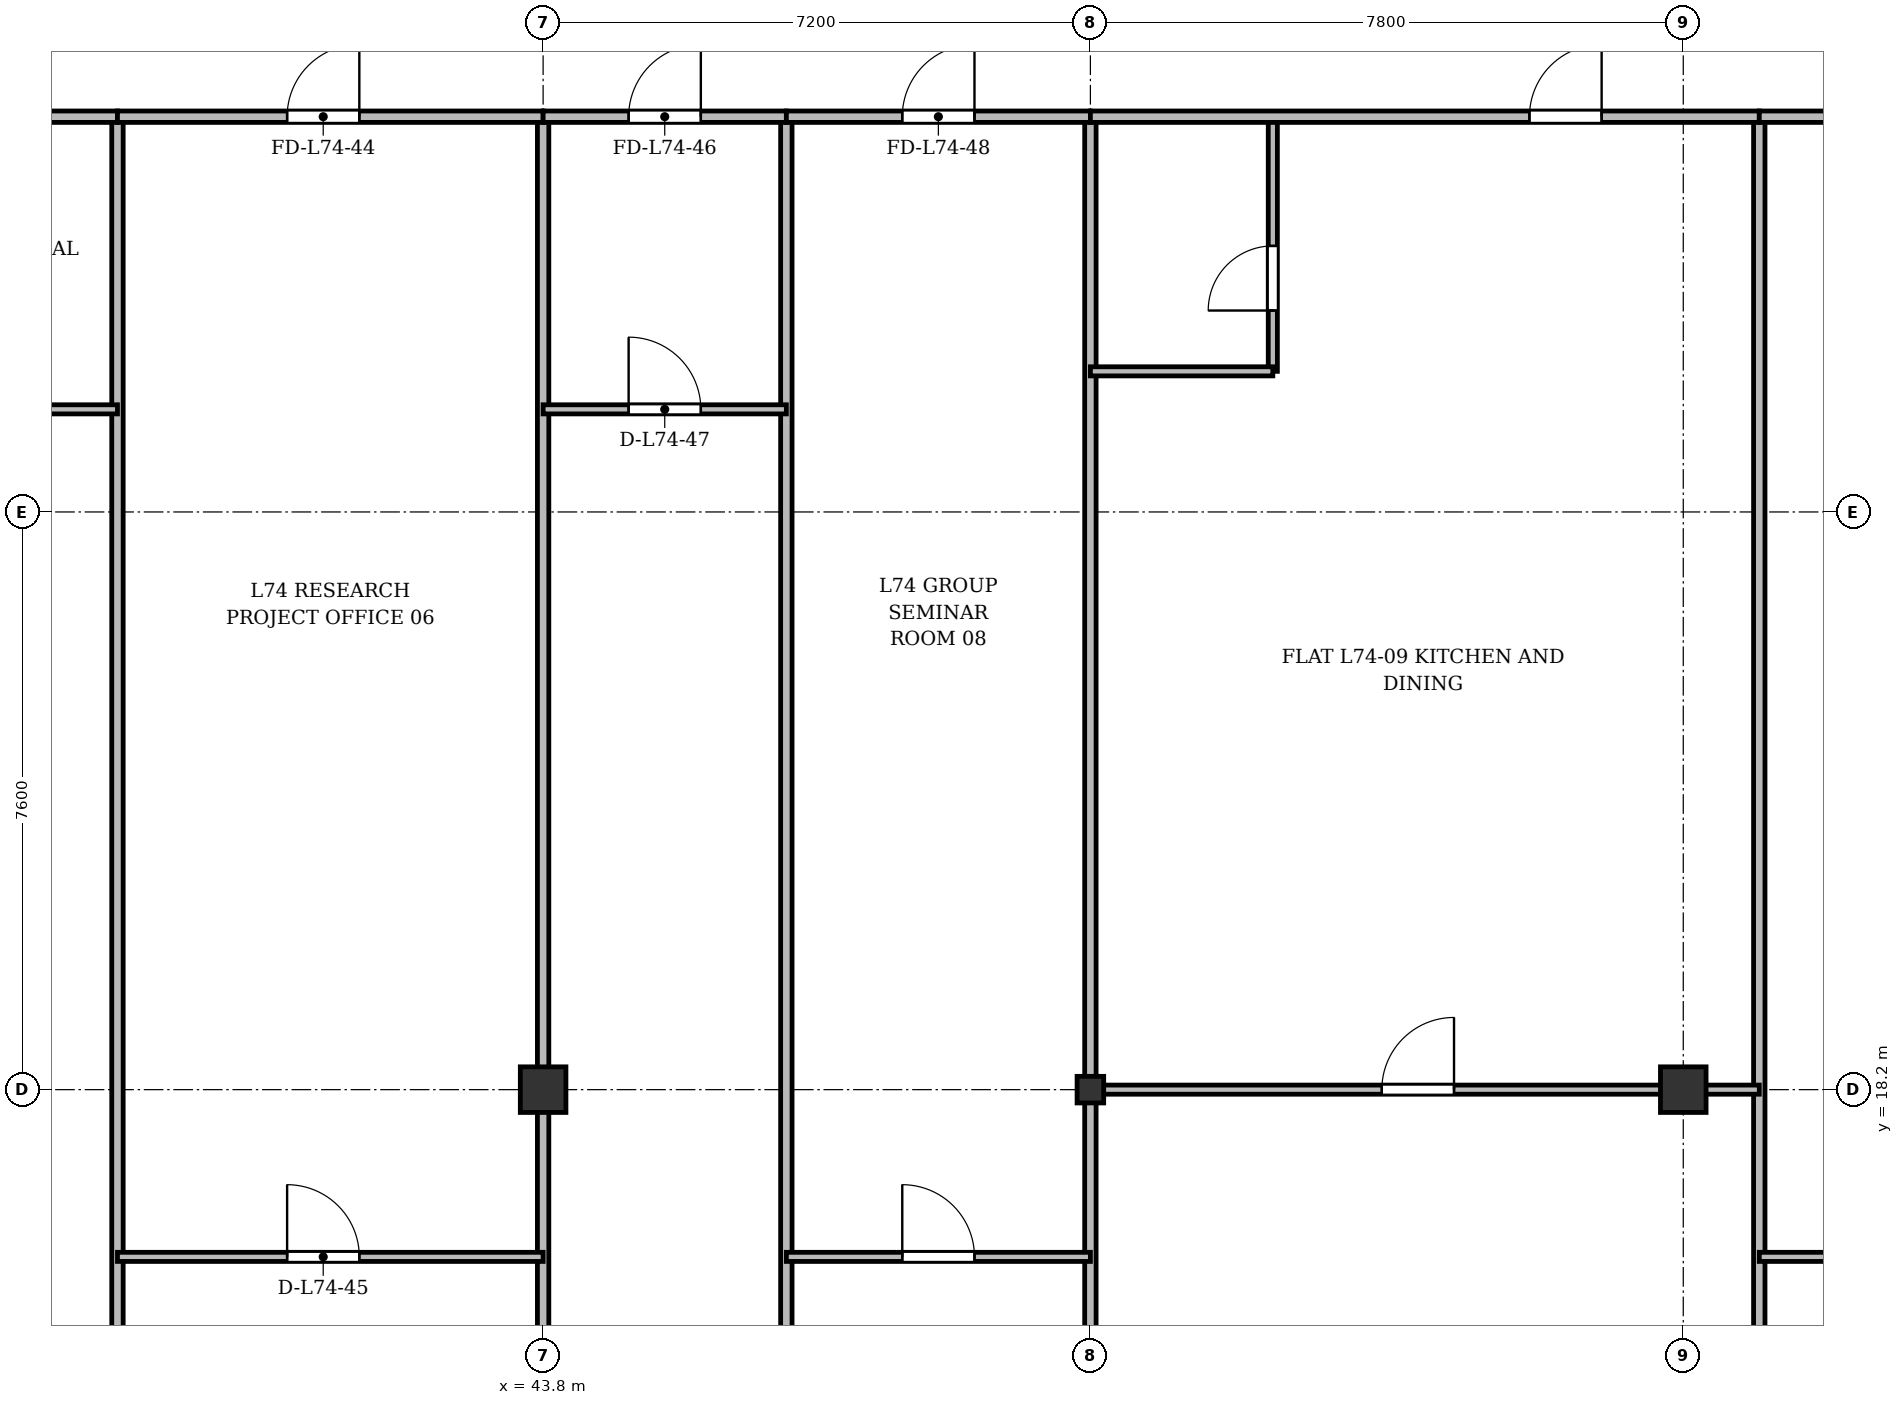
"""IFC4 building model, lengths in metres.
Left out: names, types, materials, properties, quantities, classifications, styles, units other than length and angle.
Written with IfcOpenShell. Run it as: python <this file> out.ifc"""

import sys

from ifc_helpers import new_model, si_unit, direction, frame, frame_2d, origin, origin_2d, place, context, subcontext, project, spatial, rectangle, i_section, extrude, source, transform, mapped, element, fill, save


model = new_model("IFC4")
c1 = context("Model", 3, precision=1e-05, world=origin(), true_north=direction((0.0, 1.0)))
c2 = subcontext(c1, "Body", "Model", "MODEL_VIEW")
j1 = project(units=[si_unit("LENGTHUNIT", "METRE"), si_unit("PLANEANGLEUNIT", "RADIAN")], contexts=[c1])
p1 = place(None, origin())
s1 = spatial("IfcSite", under=j1, at=p1, CompositionType="ELEMENT")
p2 = place(p1, origin())
s2 = spatial("IfcBuilding", under=s1, at=p2, CompositionType="ELEMENT")
p3 = place(p2, frame((0.0, 0.0, 284.7)))
s3 = spatial("IfcBuildingStorey", under=s2, at=p3, CompositionType="ELEMENT", Elevation=284.7)
m1 = source(origin(), c2, "Body", "SweptSolid", [
    extrude(rectangle(XDim=0.6, YDim=0.6, at=origin_2d()), origin(), (0.0, 0.0, 1.0), 3.6),
])
p4 = place(p3, frame((43.8, 18.2, 0.0), z_axis=(0.0, 0.0, 1.0), x_axis=(1.0, 0.0, 0.0)))
e1 = element("IfcColumn", 1, at=p4, inside=s3, PredefinedType="COLUMN", context=c2, shape_type="MappedRepresentation", body=[
    mapped(m1, transform((0.0, 0.0, 0.0), x_axis=(1.0, 0.0, 0.0), y_axis=(0.0, 1.0, 0.0), z_axis=(0.0, 0.0, 1.0), scale=1.0)),
])
m2 = source(origin(), c2, "Body", "SweptSolid", [
    extrude(i_section(OverallWidth=0.35, OverallDepth=0.35, WebThickness=0.018, FlangeThickness=0.028, at=origin_2d()), origin(), (0.0, 0.0, 1.0), 3.6),
])
p5 = place(p3, frame((51.0, 18.2, 0.0), z_axis=(0.0, 0.0, 1.0), x_axis=(1.0, 0.0, 0.0)))
e2 = element("IfcColumn", 2, at=p5, inside=s3, PredefinedType="COLUMN", context=c2, shape_type="MappedRepresentation", body=[
    mapped(m2, transform((0.0, 0.0, 0.0), x_axis=(1.0, 0.0, 0.0), y_axis=(0.0, 1.0, 0.0), z_axis=(0.0, 0.0, 1.0), scale=1.0)),
])
p6 = place(p3, frame((58.8, 18.2, 0.0), z_axis=(0.0, 0.0, 1.0), x_axis=(1.0, 0.0, 0.0)))
e3 = element("IfcColumn", 3, at=p6, inside=s3, PredefinedType="COLUMN", context=c2, shape_type="MappedRepresentation", body=[
    mapped(m1, transform((0.0, 0.0, 0.0), x_axis=(1.0, 0.0, 0.0), y_axis=(0.0, 1.0, 0.0), z_axis=(0.0, 0.0, 1.0), scale=1.0)),
])
p7 = place(p3, frame((38.2, 3.725, 0.0), z_axis=(0.0, 0.0, 1.0), x_axis=(0.0, 1.0, 0.0)))
e4 = element("IfcWall", 4, at=p7, inside=s3, PredefinedType="PARTITIONING", context=c2, shape_type="SweptSolid", body=[
    extrude(rectangle(XDim=27.275, YDim=0.15, at=frame_2d((13.637, 0.0))), origin(), (0.0, 0.0, 1.0), 2.92),
])
p8 = place(p3, frame((43.8, 3.725, 0.0), z_axis=(0.0, 0.0, 1.0), x_axis=(0.0, 1.0, 0.0)))
e5 = element("IfcWall", 5, at=p8, inside=s3, PredefinedType="PARTITIONING", context=c2, shape_type="SweptSolid", body=[
    extrude(rectangle(XDim=27.275, YDim=0.15, at=frame_2d((13.637, 0.0))), origin(), (0.0, 0.0, 1.0), 2.87),
])
p9 = place(p3, frame((47.0, 3.725, 0.0), z_axis=(0.0, 0.0, 1.0), x_axis=(0.0, 1.0, 0.0)))
e6 = element("IfcWall", 6, at=p9, inside=s3, PredefinedType="PARTITIONING", context=c2, shape_type="SweptSolid", body=[
    extrude(rectangle(XDim=27.275, YDim=0.15, at=frame_2d((13.637, 0.0))), origin(), (0.0, 0.0, 1.0), 2.92),
])
p10 = place(p3, frame((51.0, 3.725, 0.0), z_axis=(0.0, 0.0, 1.0), x_axis=(0.0, 1.0, 0.0)))
e7 = element("IfcWall", 7, at=p10, inside=s3, PredefinedType="PARTITIONING", context=c2, shape_type="SweptSolid", body=[
    extrude(rectangle(XDim=27.275, YDim=0.15, at=frame_2d((13.637, 0.0))), origin(), (0.0, 0.0, 1.0), 2.87),
])
p11 = place(p3, frame((59.8, 3.725, 0.0), z_axis=(0.0, 0.0, 1.0), x_axis=(0.0, 1.0, 0.0)))
e8 = element("IfcWall", 8, at=p11, inside=s3, PredefinedType="PARTITIONING", context=c2, shape_type="SweptSolid", body=[
    extrude(rectangle(XDim=27.275, YDim=0.15, at=frame_2d((13.637, 0.0))), origin(), (0.0, 0.0, 1.0), 2.92),
])
p12 = place(p3, frame((30.6, 31.0, 0.0), z_axis=(0.0, 0.0, 1.0), x_axis=(1.0, 0.0, 0.0)))
e9 = element("IfcWall", 9, at=p12, inside=s3, PredefinedType="PARTITIONING", context=c2, shape_type="SweptSolid", body=[
    extrude(rectangle(XDim=7.6, YDim=0.15, at=frame_2d((3.8, 0.0))), origin(), (0.0, 0.0, 1.0), 2.87),
])
p13 = place(p12, frame((3.325, 0.0, 0.0)))
e10 = element("IfcOpeningElement", 10, at=p13, cuts=e9, PredefinedType="OPENING", context=c2, shape_type="SweptSolid", body=[
    extrude(rectangle(XDim=0.95, YDim=2.15, at=frame_2d((0.475, 1.075))), frame((0.0, 0.085, 0.0), z_axis=(0.0, -1.0, 0.0), x_axis=(1.0, 0.0, 0.0)), (0.0, 0.0, 1.0), 0.17),
])
p14 = place(p3, frame((30.6, 27.15, 0.0), z_axis=(0.0, 0.0, 1.0), x_axis=(1.0, 0.0, 0.0)))
e11 = element("IfcWall", 11, at=p14, inside=s3, PredefinedType="PARTITIONING", context=c2, shape_type="SweptSolid", body=[
    extrude(rectangle(XDim=7.6, YDim=0.12, at=frame_2d((3.8, 0.0))), origin(), (0.0, 0.0, 1.0), 2.87),
])
p15 = place(p14, frame((3.325, 0.0, 0.0)))
e12 = element("IfcOpeningElement", 12, at=p15, cuts=e11, PredefinedType="OPENING", context=c2, shape_type="SweptSolid", body=[
    extrude(rectangle(XDim=0.95, YDim=2.15, at=frame_2d((0.475, 1.075))), frame((0.0, 0.07, 0.0), z_axis=(0.0, -1.0, 0.0), x_axis=(1.0, 0.0, 0.0)), (0.0, 0.0, 1.0), 0.14),
])
p16 = place(p3, frame((38.2, 31.0, 0.0), z_axis=(0.0, 0.0, 1.0), x_axis=(1.0, 0.0, 0.0)))
e13 = element("IfcWall", 13, at=p16, inside=s3, PredefinedType="PARTITIONING", context=c2, shape_type="SweptSolid", body=[
    extrude(rectangle(XDim=5.6, YDim=0.15, at=frame_2d((2.8, 0.0))), origin(), (0.0, 0.0, 1.0), 2.87),
])
p17 = place(p16, frame((2.232, 0.0, 0.0)))
e14 = element("IfcOpeningElement", 14, at=p17, cuts=e13, PredefinedType="OPENING", context=c2, shape_type="SweptSolid", body=[
    extrude(rectangle(XDim=0.95, YDim=2.15, at=frame_2d((0.475, 1.075))), frame((0.0, 0.085, 0.0), z_axis=(0.0, -1.0, 0.0), x_axis=(1.0, 0.0, 0.0)), (0.0, 0.0, 1.0), 0.17),
])
p18 = place(p3, frame((38.2, 16.0, 0.0), z_axis=(0.0, 0.0, 1.0), x_axis=(1.0, 0.0, 0.0)))
e15 = element("IfcWall", 15, at=p18, inside=s3, PredefinedType="PARTITIONING", context=c2, shape_type="SweptSolid", body=[
    extrude(rectangle(XDim=5.6, YDim=0.12, at=frame_2d((2.8, 0.0))), origin(), (0.0, 0.0, 1.0), 2.87),
])
p19 = place(p18, frame((2.232, 0.0, 0.0)))
e16 = element("IfcOpeningElement", 16, at=p19, cuts=e15, PredefinedType="OPENING", context=c2, shape_type="SweptSolid", body=[
    extrude(rectangle(XDim=0.95, YDim=2.15, at=frame_2d((0.475, 1.075))), frame((0.0, 0.07, 0.0), z_axis=(0.0, -1.0, 0.0), x_axis=(1.0, 0.0, 0.0)), (0.0, 0.0, 1.0), 0.14),
])
p20 = place(p3, frame((43.8, 31.0, 0.0), z_axis=(0.0, 0.0, 1.0), x_axis=(1.0, 0.0, 0.0)))
e17 = element("IfcWall", 17, at=p20, inside=s3, PredefinedType="PARTITIONING", context=c2, shape_type="SweptSolid", body=[
    extrude(rectangle(XDim=3.2, YDim=0.15, at=frame_2d((1.6, 0.0))), origin(), (0.0, 0.0, 1.0), 2.87),
])
p21 = place(p20, frame((1.125, 0.0, 0.0)))
e18 = element("IfcOpeningElement", 18, at=p21, cuts=e17, PredefinedType="OPENING", context=c2, shape_type="SweptSolid", body=[
    extrude(rectangle(XDim=0.95, YDim=2.15, at=frame_2d((0.475, 1.075))), frame((0.0, 0.085, 0.0), z_axis=(0.0, -1.0, 0.0), x_axis=(1.0, 0.0, 0.0)), (0.0, 0.0, 1.0), 0.17),
])
p22 = place(p3, frame((43.8, 27.15, 0.0), z_axis=(0.0, 0.0, 1.0), x_axis=(1.0, 0.0, 0.0)))
e19 = element("IfcWall", 19, at=p22, inside=s3, PredefinedType="PARTITIONING", context=c2, shape_type="SweptSolid", body=[
    extrude(rectangle(XDim=3.2, YDim=0.12, at=frame_2d((1.6, 0.0))), origin(), (0.0, 0.0, 1.0), 2.87),
])
p23 = place(p22, frame((1.125, 0.0, 0.0)))
e20 = element("IfcOpeningElement", 20, at=p23, cuts=e19, PredefinedType="OPENING", context=c2, shape_type="SweptSolid", body=[
    extrude(rectangle(XDim=0.95, YDim=2.15, at=frame_2d((0.475, 1.075))), frame((0.0, 0.07, 0.0), z_axis=(0.0, -1.0, 0.0), x_axis=(1.0, 0.0, 0.0)), (0.0, 0.0, 1.0), 0.14),
])
p24 = place(p3, frame((47.0, 31.0, 0.0), z_axis=(0.0, 0.0, 1.0), x_axis=(1.0, 0.0, 0.0)))
e21 = element("IfcWall", 21, at=p24, inside=s3, PredefinedType="PARTITIONING", context=c2, shape_type="SweptSolid", body=[
    extrude(rectangle(XDim=4.0, YDim=0.15, at=frame_2d((2.0, 0.0))), origin(), (0.0, 0.0, 1.0), 2.87),
])
p25 = place(p24, frame((1.525, 0.0, 0.0)))
e22 = element("IfcOpeningElement", 22, at=p25, cuts=e21, PredefinedType="OPENING", context=c2, shape_type="SweptSolid", body=[
    extrude(rectangle(XDim=0.95, YDim=2.15, at=frame_2d((0.475, 1.075))), frame((0.0, 0.085, 0.0), z_axis=(0.0, -1.0, 0.0), x_axis=(1.0, 0.0, 0.0)), (0.0, 0.0, 1.0), 0.17),
])
p26 = place(p3, frame((47.0, 16.0, 0.0), z_axis=(0.0, 0.0, 1.0), x_axis=(1.0, 0.0, 0.0)))
e23 = element("IfcWall", 23, at=p26, inside=s3, PredefinedType="PARTITIONING", context=c2, shape_type="SweptSolid", body=[
    extrude(rectangle(XDim=4.0, YDim=0.12, at=frame_2d((2.0, 0.0))), origin(), (0.0, 0.0, 1.0), 2.87),
])
p27 = place(p26, frame((1.525, 0.0, 0.0)))
e24 = element("IfcOpeningElement", 24, at=p27, cuts=e23, PredefinedType="OPENING", context=c2, shape_type="SweptSolid", body=[
    extrude(rectangle(XDim=0.95, YDim=2.15, at=frame_2d((0.475, 1.075))), frame((0.0, 0.07, 0.0), z_axis=(0.0, -1.0, 0.0), x_axis=(1.0, 0.0, 0.0)), (0.0, 0.0, 1.0), 0.14),
])
p28 = place(p3, frame((51.0, 18.2, 0.0), z_axis=(0.0, 0.0, 1.0), x_axis=(1.0, 0.0, 0.0)))
e25 = element("IfcWall", 25, at=p28, inside=s3, PredefinedType="PARTITIONING", context=c2, shape_type="SweptSolid", body=[
    extrude(rectangle(XDim=8.8, YDim=0.12, at=frame_2d((4.4, 0.0))), origin(), (0.0, 0.0, 1.0), 2.92),
])
p29 = place(p28, frame((3.834, 0.0, 0.0)))
e26 = element("IfcOpeningElement", 26, at=p29, cuts=e25, PredefinedType="OPENING", context=c2, shape_type="SweptSolid", body=[
    extrude(rectangle(XDim=0.95, YDim=2.15, at=frame_2d((0.475, 1.075))), frame((0.0, 0.07, 0.0), z_axis=(0.0, -1.0, 0.0), x_axis=(1.0, 0.0, 0.0)), (0.0, 0.0, 1.0), 0.14),
])
p30 = place(p3, frame((53.4, 27.65, 0.0), z_axis=(0.0, 0.0, 1.0), x_axis=(0.0, 1.0, 0.0)))
e27 = element("IfcWall", 27, at=p30, inside=s3, PredefinedType="PARTITIONING", context=c2, shape_type="SweptSolid", body=[
    extrude(rectangle(XDim=3.35, YDim=0.12, at=frame_2d((1.675, 0.0))), origin(), (0.0, 0.0, 1.0), 3.37),
])
p31 = place(p30, frame((0.8, 0.0, 0.0)))
e28 = element("IfcOpeningElement", 28, at=p31, cuts=e27, PredefinedType="OPENING", context=c2, shape_type="SweptSolid", body=[
    extrude(rectangle(XDim=0.85, YDim=2.1, at=frame_2d((0.425, 1.05))), frame((0.0, 0.07, 0.0), z_axis=(0.0, -1.0, 0.0), x_axis=(1.0, 0.0, 0.0)), (0.0, 0.0, 1.0), 0.14),
])
p32 = place(p3, frame((51.0, 27.65, 0.0), z_axis=(0.0, 0.0, 1.0), x_axis=(1.0, 0.0, 0.0)))
e29 = element("IfcWall", 29, at=p32, inside=s3, PredefinedType="PARTITIONING", context=c2, shape_type="SweptSolid", body=[
    extrude(rectangle(XDim=2.4, YDim=0.12, at=frame_2d((1.2, 0.0))), origin(), (0.0, 0.0, 1.0), 2.87),
])
p33 = place(p3, frame((51.0, 31.0, 0.0), z_axis=(0.0, 0.0, 1.0), x_axis=(1.0, 0.0, 0.0)))
e30 = element("IfcWall", 30, at=p33, inside=s3, PredefinedType="PARTITIONING", context=c2, shape_type="SweptSolid", body=[
    extrude(rectangle(XDim=8.8, YDim=0.15, at=frame_2d((4.4, 0.0))), origin(), (0.0, 0.0, 1.0), 2.87),
])
p34 = place(p33, frame((5.776, 0.0, 0.0)))
e31 = element("IfcOpeningElement", 31, at=p34, cuts=e30, PredefinedType="OPENING", context=c2, shape_type="SweptSolid", body=[
    extrude(rectangle(XDim=0.95, YDim=2.15, at=frame_2d((0.475, 1.075))), frame((0.0, 0.085, 0.0), z_axis=(0.0, -1.0, 0.0), x_axis=(1.0, 0.0, 0.0)), (0.0, 0.0, 1.0), 0.17),
])
p35 = place(p3, frame((59.8, 31.0, 0.0), z_axis=(0.0, 0.0, 1.0), x_axis=(1.0, 0.0, 0.0)))
e32 = element("IfcWall", 32, at=p35, inside=s3, PredefinedType="PARTITIONING", context=c2, shape_type="SweptSolid", body=[
    extrude(rectangle(XDim=6.175, YDim=0.15, at=frame_2d((3.087, 0.0))), origin(), (0.0, 0.0, 1.0), 2.87),
])
p36 = place(p35, frame((2.612, 0.0, 0.0)))
e33 = element("IfcOpeningElement", 33, at=p36, cuts=e32, PredefinedType="OPENING", context=c2, shape_type="SweptSolid", body=[
    extrude(rectangle(XDim=0.95, YDim=2.15, at=frame_2d((0.475, 1.075))), frame((0.0, 0.085, 0.0), z_axis=(0.0, -1.0, 0.0), x_axis=(1.0, 0.0, 0.0)), (0.0, 0.0, 1.0), 0.17),
])
p37 = place(p3, frame((59.8, 16.0, 0.0), z_axis=(0.0, 0.0, 1.0), x_axis=(1.0, 0.0, 0.0)))
e34 = element("IfcWall", 34, at=p37, inside=s3, PredefinedType="PARTITIONING", context=c2, shape_type="SweptSolid", body=[
    extrude(rectangle(XDim=6.175, YDim=0.12, at=frame_2d((3.087, 0.0))), origin(), (0.0, 0.0, 1.0), 2.87),
])
p38 = place(p37, frame((2.612, 0.0, 0.0)))
e35 = element("IfcOpeningElement", 35, at=p38, cuts=e34, PredefinedType="OPENING", context=c2, shape_type="SweptSolid", body=[
    extrude(rectangle(XDim=0.95, YDim=2.15, at=frame_2d((0.475, 1.075))), frame((0.0, 0.07, 0.0), z_axis=(0.0, -1.0, 0.0), x_axis=(1.0, 0.0, 0.0)), (0.0, 0.0, 1.0), 0.14),
])
m3 = source(origin(), c2, "Body", "SweptSolid", [
    extrude(rectangle(XDim=0.95, YDim=2.15, at=frame_2d((0.475, 1.075))), frame((0.0, 0.025, 0.0), z_axis=(0.0, -1.0, 0.0), x_axis=(1.0, 0.0, 0.0)), (0.0, 0.0, 1.0), 0.05),
])
p39 = place(p17, origin())
e36 = element("IfcDoor", 36, at=p39, inside=s3, OperationType="SINGLE_SWING_RIGHT", PredefinedType="DOOR", context=c2, shape_type="MappedRepresentation", body=[
    mapped(m3, transform((0.0, 0.0, 0.0), x_axis=(1.0, 0.0, 0.0), y_axis=(0.0, 1.0, 0.0), z_axis=(0.0, 0.0, 1.0), scale=1.0)),
])
fill(e14, e36)
p40 = place(p19, origin())
e37 = element("IfcDoor", 37, at=p40, inside=s3, OperationType="SINGLE_SWING_LEFT", PredefinedType="DOOR", context=c2, shape_type="MappedRepresentation", body=[
    mapped(m3, transform((0.0, 0.0, 0.0), x_axis=(1.0, 0.0, 0.0), y_axis=(0.0, 1.0, 0.0), z_axis=(0.0, 0.0, 1.0), scale=1.0)),
])
fill(e16, e37)
p41 = place(p21, origin())
e38 = element("IfcDoor", 38, at=p41, inside=s3, OperationType="SINGLE_SWING_RIGHT", PredefinedType="DOOR", context=c2, shape_type="MappedRepresentation", body=[
    mapped(m3, transform((0.0, 0.0, 0.0), x_axis=(1.0, 0.0, 0.0), y_axis=(0.0, 1.0, 0.0), z_axis=(0.0, 0.0, 1.0), scale=1.0)),
])
fill(e18, e38)
p42 = place(p23, origin())
e39 = element("IfcDoor", 39, at=p42, inside=s3, OperationType="SINGLE_SWING_LEFT", PredefinedType="DOOR", context=c2, shape_type="MappedRepresentation", body=[
    mapped(m3, transform((0.0, 0.0, 0.0), x_axis=(1.0, 0.0, 0.0), y_axis=(0.0, 1.0, 0.0), z_axis=(0.0, 0.0, 1.0), scale=1.0)),
])
fill(e20, e39)
p43 = place(p25, origin())
e40 = element("IfcDoor", 40, at=p43, inside=s3, OperationType="SINGLE_SWING_RIGHT", PredefinedType="DOOR", context=c2, shape_type="MappedRepresentation", body=[
    mapped(m3, transform((0.0, 0.0, 0.0), x_axis=(1.0, 0.0, 0.0), y_axis=(0.0, 1.0, 0.0), z_axis=(0.0, 0.0, 1.0), scale=1.0)),
])
fill(e22, e40)
p44 = place(p27, origin())
e41 = element("IfcDoor", 41, at=p44, inside=s3, OperationType="SINGLE_SWING_LEFT", PredefinedType="DOOR", context=c2, shape_type="MappedRepresentation", body=[
    mapped(m3, transform((0.0, 0.0, 0.0), x_axis=(1.0, 0.0, 0.0), y_axis=(0.0, 1.0, 0.0), z_axis=(0.0, 0.0, 1.0), scale=1.0)),
])
fill(e24, e41)
p45 = place(p29, origin())
e42 = element("IfcDoor", 42, at=p45, inside=s3, OperationType="SINGLE_SWING_RIGHT", PredefinedType="DOOR", context=c2, shape_type="MappedRepresentation", body=[
    mapped(m3, transform((0.0, 0.0, 0.0), x_axis=(1.0, 0.0, 0.0), y_axis=(0.0, 1.0, 0.0), z_axis=(0.0, 0.0, 1.0), scale=1.0)),
])
fill(e26, e42)
m4 = source(origin(), c2, "Body", "SweptSolid", [
    extrude(rectangle(XDim=0.85, YDim=2.1, at=frame_2d((0.425, 1.05))), frame((0.0, 0.025, 0.0), z_axis=(0.0, -1.0, 0.0), x_axis=(1.0, 0.0, 0.0)), (0.0, 0.0, 1.0), 0.05),
])
p46 = place(p31, origin())
e43 = element("IfcDoor", 43, at=p46, inside=s3, OperationType="SINGLE_SWING_LEFT", PredefinedType="DOOR", context=c2, shape_type="MappedRepresentation", body=[
    mapped(m4, transform((0.0, 0.0, 0.0), x_axis=(1.0, 0.0, 0.0), y_axis=(0.0, 1.0, 0.0), z_axis=(0.0, 0.0, 1.0), scale=1.0)),
])
fill(e28, e43)
p47 = place(p34, origin())
e44 = element("IfcDoor", 44, at=p47, inside=s3, OperationType="SINGLE_SWING_RIGHT", PredefinedType="DOOR", context=c2, shape_type="MappedRepresentation", body=[
    mapped(m3, transform((0.0, 0.0, 0.0), x_axis=(1.0, 0.0, 0.0), y_axis=(0.0, 1.0, 0.0), z_axis=(0.0, 0.0, 1.0), scale=1.0)),
])
fill(e31, e44)
save(model, sys.argv[1])
